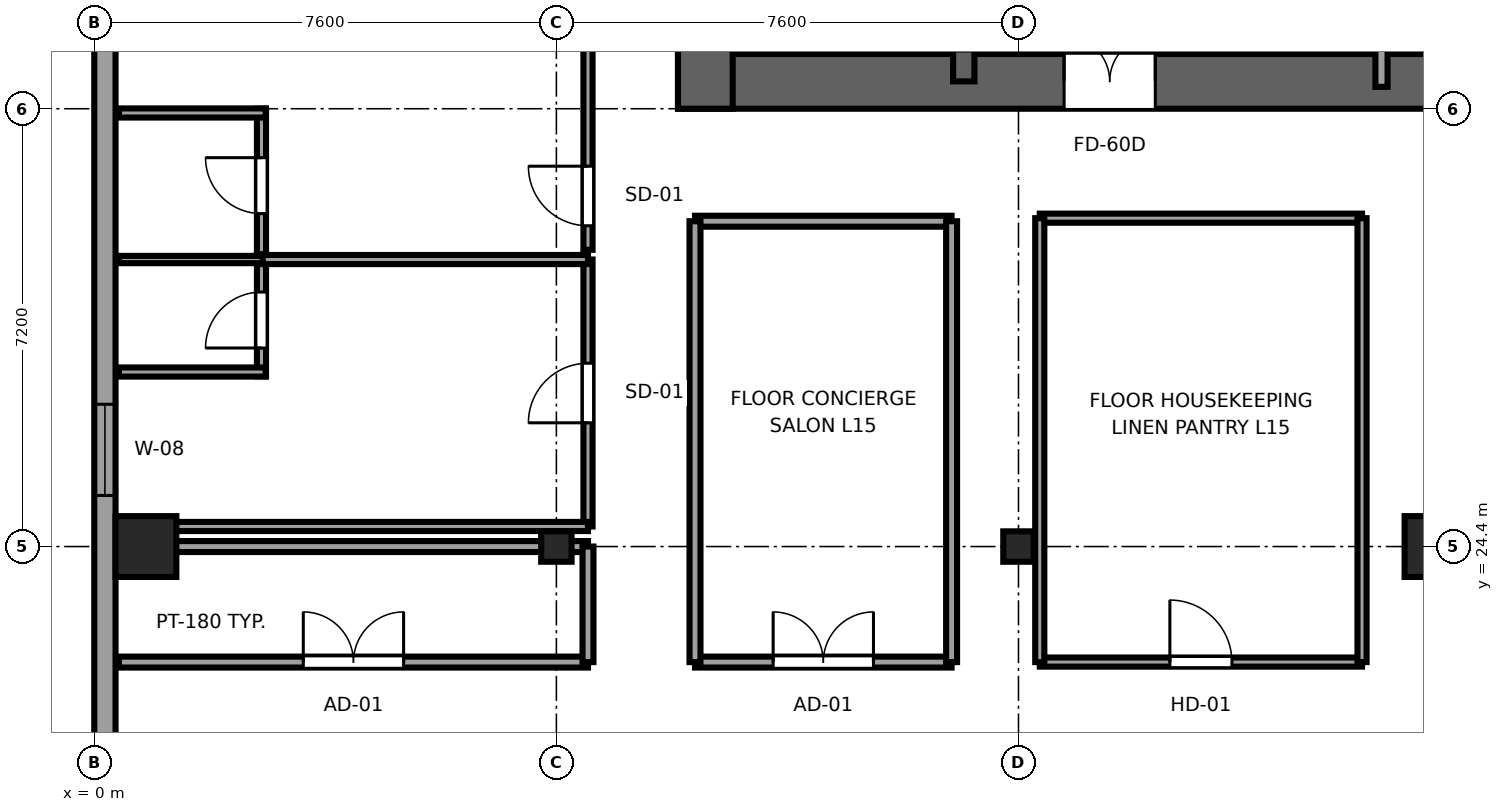
"""IFC4 building model, lengths in metres.
Left out: names, types, materials, properties, quantities, classifications, styles, units other than length and angle.
Written with IfcOpenShell. Run it as: python <this file> out.ifc"""

import sys

from ifc_helpers import new_model, si_unit, direction, frame, frame_2d, origin, origin_2d, place, context, subcontext, project, spatial, rectangle, i_section, extrude, source, transform, mapped, element, fill, save


model = new_model("IFC4")
c1 = context("Model", 3, precision=1e-05, world=origin(), true_north=direction((0.0, 1.0)))
c2 = subcontext(c1, "Body", "Model", "MODEL_VIEW")
j1 = project(units=[si_unit("LENGTHUNIT", "METRE"), si_unit("PLANEANGLEUNIT", "RADIAN")], contexts=[c1])
p1 = place(None, origin())
s1 = spatial("IfcSite", under=j1, at=p1, CompositionType="ELEMENT")
p2 = place(p1, origin())
s2 = spatial("IfcBuilding", under=s1, at=p2, CompositionType="ELEMENT")
p3 = place(p2, frame((0.0, 0.0, 63.95)))
s3 = spatial("IfcBuildingStorey", under=s2, at=p3, CompositionType="ELEMENT", Elevation=63.95)
p4 = place(p3, frame((9.6, 32.05, 0.0), z_axis=(0.0, 0.0, 1.0), x_axis=(1.0, 0.0, 0.0)))
e1 = element("IfcWall", 1, at=p4, inside=s3, PredefinedType="SHEAR", context=c2, shape_type="SweptSolid", body=[
    extrude(rectangle(XDim=26.8, YDim=0.9, at=frame_2d((13.4, 0.0))), origin(), (0.0, 0.0, 1.0), 3.55),
])
p5 = place(p4, frame((7.85, 0.0, 0.0), z_axis=(0.0, 0.0, 1.0), x_axis=(-1.0, 0.0, 0.0)))
e2 = element("IfcOpeningElement", 2, at=p5, cuts=e1, PredefinedType="OPENING", context=c2, shape_type="SweptSolid", body=[
    extrude(rectangle(XDim=1.5, YDim=2.04, at=frame_2d((0.75, 1.02))), frame((0.0, 0.46, 0.0), z_axis=(0.0, -1.0, 0.0), x_axis=(1.0, 0.0, 0.0)), (0.0, 0.0, 1.0), 0.92),
])
p6 = place(p4, frame((14.15, 0.0, 0.0), z_axis=(0.0, 0.0, 1.0), x_axis=(-1.0, 0.0, 0.0)))
e3 = element("IfcOpeningElement", 3, at=p6, cuts=e1, PredefinedType="OPENING", context=c2, shape_type="SweptSolid", body=[
    extrude(rectangle(XDim=1.5, YDim=2.04, at=frame_2d((0.75, 1.02))), frame((0.0, 0.46, 0.0), z_axis=(0.0, -1.0, 0.0), x_axis=(1.0, 0.0, 0.0)), (0.0, 0.0, 1.0), 0.92),
])
p7 = place(p4, frame((20.45, 0.0, 0.0), z_axis=(0.0, 0.0, 1.0), x_axis=(-1.0, 0.0, 0.0)))
e4 = element("IfcOpeningElement", 4, at=p7, cuts=e1, PredefinedType="OPENING", context=c2, shape_type="SweptSolid", body=[
    extrude(rectangle(XDim=1.5, YDim=2.04, at=frame_2d((0.75, 1.02))), frame((0.0, 0.46, 0.0), z_axis=(0.0, -1.0, 0.0), x_axis=(1.0, 0.0, 0.0)), (0.0, 0.0, 1.0), 0.92),
])
p8 = place(p3, frame((10.05, 31.6, 0.0), z_axis=(0.0, 0.0, 1.0), x_axis=(0.0, 1.0, 0.0)))
e5 = element("IfcWall", 5, at=p8, inside=s3, PredefinedType="SHEAR", context=c2, shape_type="SweptSolid", body=[
    extrude(rectangle(XDim=13.6, YDim=0.9, at=frame_2d((6.8, 0.0))), origin(), (0.0, 0.0, 1.0), 3.55),
])
p9 = place(p3, frame((14.3, 32.05, 0.0), z_axis=(0.0, 0.0, 1.0), x_axis=(0.0, 1.0, 0.0)))
e6 = element("IfcWall", 6, at=p9, inside=s3, PredefinedType="SHEAR", context=c2, shape_type="SweptSolid", body=[
    extrude(rectangle(XDim=12.7, YDim=0.35, at=frame_2d((6.35, 0.0))), origin(), (0.0, 0.0, 1.0), 3.55),
])
p10 = place(p9, frame((0.5, 0.0, 0.0)))
e7 = element("IfcOpeningElement", 7, at=p10, cuts=e6, PredefinedType="OPENING", context=c2, shape_type="SweptSolid", body=[
    extrude(rectangle(XDim=1.1, YDim=2.12, at=frame_2d((0.55, 1.06))), frame((0.0, 0.185, 0.0), z_axis=(0.0, -1.0, 0.0), x_axis=(1.0, 0.0, 0.0)), (0.0, 0.0, 1.0), 0.37),
])
m1 = source(origin(), c2, "Body", "SweptSolid", [
    extrude(rectangle(XDim=1.0, YDim=1.0, at=origin_2d()), origin(), (0.0, 0.0, 1.0), 3.55),
])
p11 = place(p3, frame((0.85, 24.4, 0.0), z_axis=(0.0, 0.0, 1.0), x_axis=(1.0, 0.0, 0.0)))
e8 = element("IfcColumn", 8, at=p11, inside=s3, PredefinedType="COLUMN", context=c2, shape_type="MappedRepresentation", body=[
    mapped(m1, transform((0.0, 0.0, 0.0), x_axis=(1.0, 0.0, 0.0), y_axis=(0.0, 1.0, 0.0), z_axis=(0.0, 0.0, 1.0), scale=1.0)),
])
m2 = source(origin(), c2, "Body", "SweptSolid", [
    extrude(i_section(OverallWidth=0.5, OverallDepth=0.5, WebThickness=0.028, FlangeThickness=0.045, at=origin_2d()), origin(), (0.0, 0.0, 1.0), 3.55),
])
for number, where, z_axis, x_axis in (
    (9, (7.6, 24.4, 0.0), (0.0, 0.0, 1.0), (1.0, 0.0, 0.0)),
    (10, (15.2, 24.4, 0.0), (0.0, 0.0, 1.0), (1.0, 0.0, 0.0)),
):
    element("IfcColumn", number, at=place(p3, frame(where, z_axis=z_axis, x_axis=x_axis)), inside=s3, PredefinedType="COLUMN", context=c2, shape_type="MappedRepresentation", body=[
        mapped(m2, transform((0.0, 0.0, 0.0), x_axis=(1.0, 0.0, 0.0), y_axis=(0.0, 1.0, 0.0), z_axis=(0.0, 0.0, 1.0), scale=1.0)),
    ])
p12 = place(p3, frame((22.05, 24.4, 0.0), z_axis=(0.0, 0.0, 1.0), x_axis=(1.0, 0.0, 0.0)))
e11 = element("IfcColumn", 11, at=p12, inside=s3, PredefinedType="COLUMN", context=c2, shape_type="MappedRepresentation", body=[
    mapped(m1, transform((0.0, 0.0, 0.0), x_axis=(1.0, 0.0, 0.0), y_axis=(0.0, 1.0, 0.0), z_axis=(0.0, 0.0, 1.0), scale=1.0)),
])
p13 = place(p3, frame((0.175, 41.383, 0.0), z_axis=(0.0, 0.0, 1.0), x_axis=(0.0, -1.0, 0.0)))
e12 = element("IfcWall", 12, at=p13, inside=s3, PredefinedType="SOLIDWALL", context=c2, shape_type="SweptSolid", body=[
    extrude(rectangle(XDim=36.766, YDim=0.35, at=frame_2d((18.383, 0.0))), origin(), (0.0, 0.0, 1.0), 3.37),
])
p14 = place(p13, frame((1.526, 0.0, 0.68)))
e13 = element("IfcOpeningElement", 13, at=p14, cuts=e12, PredefinedType="OPENING", context=c2, shape_type="SweptSolid", body=[
    extrude(rectangle(XDim=2.1, YDim=1.9, at=frame_2d((1.05, 0.95))), frame((0.0, 0.185, 0.0), z_axis=(0.0, -1.0, 0.0), x_axis=(1.0, 0.0, 0.0)), (0.0, 0.0, 1.0), 0.37),
])
p15 = place(p13, frame((4.428, 0.0, 0.68)))
e14 = element("IfcOpeningElement", 14, at=p15, cuts=e12, PredefinedType="OPENING", context=c2, shape_type="SweptSolid", body=[
    extrude(rectangle(XDim=2.1, YDim=1.9, at=frame_2d((1.05, 0.95))), frame((0.0, 0.185, 0.0), z_axis=(0.0, -1.0, 0.0), x_axis=(1.0, 0.0, 0.0)), (0.0, 0.0, 1.0), 0.37),
])
p16 = place(p13, frame((21.835, 0.0, 0.68)))
e15 = element("IfcOpeningElement", 15, at=p16, cuts=e12, PredefinedType="OPENING", context=c2, shape_type="SweptSolid", body=[
    extrude(rectangle(XDim=2.1, YDim=1.9, at=frame_2d((1.05, 0.95))), frame((0.0, 0.185, 0.0), z_axis=(0.0, -1.0, 0.0), x_axis=(1.0, 0.0, 0.0)), (0.0, 0.0, 1.0), 0.37),
])
p17 = place(p13, frame((28.638, 0.0, 0.68)))
e16 = element("IfcOpeningElement", 16, at=p17, cuts=e12, PredefinedType="OPENING", context=c2, shape_type="SweptSolid", body=[
    extrude(rectangle(XDim=2.1, YDim=1.9, at=frame_2d((1.05, 0.95))), frame((0.0, 0.185, 0.0), z_axis=(0.0, -1.0, 0.0), x_axis=(1.0, 0.0, 0.0)), (0.0, 0.0, 1.0), 0.37),
])
p18 = place(p13, frame((33.893, 0.0, 0.62)))
e17 = element("IfcOpeningElement", 17, at=p18, cuts=e12, PredefinedType="OPENING", context=c2, shape_type="SweptSolid", body=[
    extrude(rectangle(XDim=1.5, YDim=1.55, at=frame_2d((0.75, 0.775))), frame((0.0, 0.185, 0.0), z_axis=(0.0, -1.0, 0.0), x_axis=(1.0, 0.0, 0.0)), (0.0, 0.0, 1.0), 0.37),
])
p19 = place(p13, frame((14.643, 0.0, 0.62)))
e18 = element("IfcOpeningElement", 18, at=p19, cuts=e12, PredefinedType="OPENING", context=c2, shape_type="SweptSolid", body=[
    extrude(rectangle(XDim=1.5, YDim=1.55, at=frame_2d((0.75, 0.775))), frame((0.0, 0.185, 0.0), z_axis=(0.0, -1.0, 0.0), x_axis=(1.0, 0.0, 0.0)), (0.0, 0.0, 1.0), 0.37),
])
p20 = place(p3, frame((18.92, 32.504, 0.0), z_axis=(0.0, 0.0, 1.0), x_axis=(0.0, 1.0, 0.0)))
e19 = element("IfcWall", 19, at=p20, inside=s3, PredefinedType="SOLIDWALL", context=c2, shape_type="SweptSolid", body=[
    extrude(rectangle(XDim=3.646, YDim=0.2, at=frame_2d((1.823, 0.0))), origin(), (0.0, 0.0, 1.0), 3.37),
])
p21 = place(p3, frame((21.17, 31.96, 0.0), z_axis=(0.0, 0.0, 1.0), x_axis=(0.0, 1.0, 0.0)))
e20 = element("IfcWall", 20, at=p21, inside=s3, PredefinedType="SOLIDWALL", context=c2, shape_type="SweptSolid", body=[
    extrude(rectangle(XDim=12.58, YDim=0.2, at=frame_2d((6.29, 0.0))), origin(), (0.0, 0.0, 1.0), 3.37),
])
p22 = place(p3, frame((2.75, 27.2, 0.0), z_axis=(0.0, 0.0, 1.0), x_axis=(0.0, 1.0, 0.0)))
e21 = element("IfcWall", 21, at=p22, inside=s3, PredefinedType="PARTITIONING", context=c2, shape_type="SweptSolid", body=[
    extrude(rectangle(XDim=1.99, YDim=0.15, at=frame_2d((0.995, 0.0))), origin(), (0.0, 0.0, 1.0), 3.37),
])
p23 = place(p22, frame((0.465, 0.0, 0.0)))
e22 = element("IfcOpeningElement", 22, at=p23, cuts=e21, PredefinedType="OPENING", context=c2, shape_type="SweptSolid", body=[
    extrude(rectangle(XDim=0.92, YDim=2.01, at=frame_2d((0.46, 1.005))), frame((0.0, 0.085, 0.0), z_axis=(0.0, -1.0, 0.0), x_axis=(1.0, 0.0, 0.0)), (0.0, 0.0, 1.0), 0.17),
])
p24 = place(p3, frame((0.405, 27.27, 0.0), z_axis=(0.0, 0.0, 1.0), x_axis=(1.0, 0.0, 0.0)))
e23 = element("IfcWall", 23, at=p24, inside=s3, PredefinedType="PARTITIONING", context=c2, shape_type="SweptSolid", body=[
    extrude(rectangle(XDim=2.415, YDim=0.15, at=frame_2d((1.208, 0.0))), origin(), (0.0, 0.0, 1.0), 3.37),
])
p25 = place(p3, frame((0.405, 29.12, 0.0), z_axis=(0.0, 0.0, 1.0), x_axis=(1.0, 0.0, 0.0)))
e24 = element("IfcWall", 24, at=p25, inside=s3, PredefinedType="PLUMBINGWALL", context=c2, shape_type="SweptSolid", body=[
    extrude(rectangle(XDim=2.415, YDim=0.12, at=frame_2d((1.208, 0.0))), origin(), (0.0, 0.0, 1.0), 2.748),
])
p26 = place(p3, frame((2.75, 29.21, 0.0), z_axis=(0.0, 0.0, 1.0), x_axis=(0.0, 1.0, 0.0)))
e25 = element("IfcWall", 25, at=p26, inside=s3, PredefinedType="PARTITIONING", context=c2, shape_type="SweptSolid", body=[
    extrude(rectangle(XDim=2.39, YDim=0.15, at=frame_2d((1.195, 0.0))), origin(), (0.0, 0.0, 1.0), 3.37),
])
p27 = place(p26, frame((0.665, 0.0, 0.0)))
e26 = element("IfcOpeningElement", 26, at=p27, cuts=e25, PredefinedType="OPENING", context=c2, shape_type="SweptSolid", body=[
    extrude(rectangle(XDim=0.92, YDim=2.01, at=frame_2d((0.46, 1.005))), frame((0.0, 0.085, 0.0), z_axis=(0.0, -1.0, 0.0), x_axis=(1.0, 0.0, 0.0)), (0.0, 0.0, 1.0), 0.17),
])
p28 = place(p3, frame((0.405, 31.53, 0.0), z_axis=(0.0, 0.0, 1.0), x_axis=(1.0, 0.0, 0.0)))
e27 = element("IfcWall", 27, at=p28, inside=s3, PredefinedType="PARTITIONING", context=c2, shape_type="SweptSolid", body=[
    extrude(rectangle(XDim=2.415, YDim=0.15, at=frame_2d((1.208, 0.0))), origin(), (0.0, 0.0, 1.0), 3.37),
])
p29 = place(p3, frame((0.405, 22.5, 0.0), z_axis=(0.0, 0.0, 1.0), x_axis=(1.0, 0.0, 0.0)))
e28 = element("IfcWall", 28, at=p29, inside=s3, PredefinedType="PARTITIONING", context=c2, shape_type="SweptSolid", body=[
    extrude(rectangle(XDim=7.715, YDim=0.18, at=frame_2d((3.857, 0.0))), origin(), (0.0, 0.0, 1.0), 3.37),
])
p30 = place(p29, frame((3.032, 0.0, 0.0)))
e29 = element("IfcOpeningElement", 29, at=p30, cuts=e28, PredefinedType="OPENING", context=c2, shape_type="SweptSolid", body=[
    extrude(rectangle(XDim=1.65, YDim=2.15, at=frame_2d((0.825, 1.075))), frame((0.0, 0.1, 0.0), z_axis=(0.0, -1.0, 0.0), x_axis=(1.0, 0.0, 0.0)), (0.0, 0.0, 1.0), 0.2),
])
p31 = place(p3, frame((0.405, 24.4, 0.0), z_axis=(0.0, 0.0, 1.0), x_axis=(1.0, 0.0, 0.0)))
e30 = element("IfcWall", 30, at=p31, inside=s3, PredefinedType="PARTITIONING", context=c2, shape_type="SweptSolid", body=[
    extrude(rectangle(XDim=7.715, YDim=0.18, at=frame_2d((3.857, 0.0))), origin(), (0.0, 0.0, 1.0), 2.748),
])
p32 = place(p3, frame((8.12, 22.5, 0.0), z_axis=(0.0, 0.0, 1.0), x_axis=(0.0, 1.0, 0.0)))
e31 = element("IfcWall", 31, at=p32, inside=s3, PredefinedType="PARTITIONING", context=c2, shape_type="SweptSolid", body=[
    extrude(rectangle(XDim=1.9, YDim=0.18, at=frame_2d((0.95, 0.0))), origin(), (0.0, 0.0, 1.0), 3.37),
])
p33 = place(p3, frame((8.12, 24.73, 0.0), z_axis=(0.0, 0.0, 1.0), x_axis=(0.0, 1.0, 0.0)))
e32 = element("IfcWall", 32, at=p33, inside=s3, PredefinedType="PARTITIONING", context=c2, shape_type="SweptSolid", body=[
    extrude(rectangle(XDim=4.39, YDim=0.15, at=frame_2d((2.195, 0.0))), origin(), (0.0, 0.0, 1.0), 3.37),
])
p34 = place(p33, frame((1.705, 0.0, 0.0)))
e33 = element("IfcOpeningElement", 33, at=p34, cuts=e32, PredefinedType="OPENING", context=c2, shape_type="SweptSolid", body=[
    extrude(rectangle(XDim=0.98, YDim=2.12, at=frame_2d((0.49, 1.06))), frame((0.0, 0.085, 0.0), z_axis=(0.0, -1.0, 0.0), x_axis=(1.0, 0.0, 0.0)), (0.0, 0.0, 1.0), 0.17),
])
p35 = place(p3, frame((0.405, 24.73, 0.0), z_axis=(0.0, 0.0, 1.0), x_axis=(1.0, 0.0, 0.0)))
e34 = element("IfcWall", 34, at=p35, inside=s3, PredefinedType="PARTITIONING", context=c2, shape_type="SweptSolid", body=[
    extrude(rectangle(XDim=7.715, YDim=0.15, at=frame_2d((3.857, 0.0))), origin(), (0.0, 0.0, 1.0), 3.37),
])
p36 = place(p3, frame((2.77, 29.12, 0.0), z_axis=(0.0, 0.0, 1.0), x_axis=(1.0, 0.0, 0.0)))
e35 = element("IfcWall", 35, at=p36, inside=s3, PredefinedType="PARTITIONING", context=c2, shape_type="SweptSolid", body=[
    extrude(rectangle(XDim=5.35, YDim=0.15, at=frame_2d((2.675, 0.0))), origin(), (0.0, 0.0, 1.0), 2.748),
])
p37 = place(p3, frame((8.12, 29.28, 0.0), z_axis=(0.0, 0.0, 1.0), x_axis=(0.0, 1.0, 0.0)))
e36 = element("IfcWall", 36, at=p37, inside=s3, PredefinedType="PARTITIONING", context=c2, shape_type="SweptSolid", body=[
    extrude(rectangle(XDim=16.315, YDim=0.15, at=frame_2d((8.157, 0.0))), origin(), (0.0, 0.0, 1.0), 3.37),
])
p38 = place(p37, frame((0.395, 0.0, 0.0)))
e37 = element("IfcOpeningElement", 37, at=p38, cuts=e36, PredefinedType="OPENING", context=c2, shape_type="SweptSolid", body=[
    extrude(rectangle(XDim=0.98, YDim=2.12, at=frame_2d((0.49, 1.06))), frame((0.0, 0.085, 0.0), z_axis=(0.0, -1.0, 0.0), x_axis=(1.0, 0.0, 0.0)), (0.0, 0.0, 1.0), 0.17),
])
p39 = place(p3, frame((9.88, 22.5, 0.0), z_axis=(0.0, 0.0, 1.0), x_axis=(1.0, 0.0, 0.0)))
e38 = element("IfcWall", 38, at=p39, inside=s3, PredefinedType="PARTITIONING", context=c2, shape_type="SweptSolid", body=[
    extrude(rectangle(XDim=4.22, YDim=0.18, at=frame_2d((2.11, 0.0))), origin(), (0.0, 0.0, 1.0), 3.37),
])
p40 = place(p39, frame((1.285, 0.0, 0.0)))
e39 = element("IfcOpeningElement", 39, at=p40, cuts=e38, PredefinedType="OPENING", context=c2, shape_type="SweptSolid", body=[
    extrude(rectangle(XDim=1.65, YDim=2.15, at=frame_2d((0.825, 1.075))), frame((0.0, 0.1, 0.0), z_axis=(0.0, -1.0, 0.0), x_axis=(1.0, 0.0, 0.0)), (0.0, 0.0, 1.0), 0.2),
])
p41 = place(p3, frame((9.88, 29.75, 0.0), z_axis=(0.0, 0.0, 1.0), x_axis=(1.0, 0.0, 0.0)))
e40 = element("IfcWall", 40, at=p41, inside=s3, PredefinedType="PARTITIONING", context=c2, shape_type="SweptSolid", body=[
    extrude(rectangle(XDim=4.22, YDim=0.18, at=frame_2d((2.11, 0.0))), origin(), (0.0, 0.0, 1.0), 3.37),
])
for number, where, z_axis, x_axis in (
    (41, (9.88, 22.5, 0.0), (0.0, 0.0, 1.0), (0.0, 1.0, 0.0)),
    (42, (14.1, 22.5, 0.0), (0.0, 0.0, 1.0), (0.0, 1.0, 0.0)),
):
    element("IfcWall", number, at=place(p3, frame(where, z_axis=z_axis, x_axis=x_axis)), inside=s3, PredefinedType="PARTITIONING", context=c2, shape_type="SweptSolid", body=[
        extrude(rectangle(XDim=7.25, YDim=0.18, at=frame_2d((3.625, 0.0))), origin(), (0.0, 0.0, 1.0), 3.37),
    ])
p42 = place(p3, frame((15.55, 22.5, 0.0), z_axis=(0.0, 0.0, 1.0), x_axis=(1.0, 0.0, 0.0)))
e43 = element("IfcWall", 43, at=p42, inside=s3, PredefinedType="PARTITIONING", context=c2, shape_type="SweptSolid", body=[
    extrude(rectangle(XDim=5.3, YDim=0.15, at=frame_2d((2.65, 0.0))), origin(), (0.0, 0.0, 1.0), 3.37),
])
p43 = place(p42, frame((2.14, 0.0, 0.0)))
e44 = element("IfcOpeningElement", 44, at=p43, cuts=e43, PredefinedType="OPENING", context=c2, shape_type="SweptSolid", body=[
    extrude(rectangle(XDim=1.02, YDim=2.03, at=frame_2d((0.51, 1.015))), frame((0.0, 0.085, 0.0), z_axis=(0.0, -1.0, 0.0), x_axis=(1.0, 0.0, 0.0)), (0.0, 0.0, 1.0), 0.17),
])
p44 = place(p3, frame((15.55, 29.8, 0.0), z_axis=(0.0, 0.0, 1.0), x_axis=(1.0, 0.0, 0.0)))
e45 = element("IfcWall", 45, at=p44, inside=s3, PredefinedType="PARTITIONING", context=c2, shape_type="SweptSolid", body=[
    extrude(rectangle(XDim=5.3, YDim=0.15, at=frame_2d((2.65, 0.0))), origin(), (0.0, 0.0, 1.0), 3.37),
])
for number, where, z_axis, x_axis in (
    (46, (15.55, 22.5, 0.0), (0.0, 0.0, 1.0), (0.0, 1.0, 0.0)),
    (47, (20.85, 22.5, 0.0), (0.0, 0.0, 1.0), (0.0, 1.0, 0.0)),
):
    element("IfcWall", number, at=place(p3, frame(where, z_axis=z_axis, x_axis=x_axis)), inside=s3, PredefinedType="PARTITIONING", context=c2, shape_type="SweptSolid", body=[
        extrude(rectangle(XDim=7.3, YDim=0.15, at=frame_2d((3.65, 0.0))), origin(), (0.0, 0.0, 1.0), 3.37),
    ])
m3 = source(origin(), c2, "Body", "SweptSolid", [
    extrude(rectangle(XDim=1.5, YDim=1.55, at=frame_2d((0.75, 0.775))), frame((0.0, 0.09, 0.0), z_axis=(0.0, -1.0, 0.0), x_axis=(1.0, 0.0, 0.0)), (0.0, 0.0, 1.0), 0.06),
])
p45 = place(p19, origin())
e48 = element("IfcWindow", 48, at=p45, inside=s3, PartitioningType="SINGLE_PANEL", PredefinedType="WINDOW", context=c2, shape_type="MappedRepresentation", body=[
    mapped(m3, transform((0.0, 0.0, 0.0), x_axis=(1.0, 0.0, 0.0), y_axis=(0.0, 1.0, 0.0), z_axis=(0.0, 0.0, 1.0), scale=1.0)),
])
fill(e18, e48)
m4 = source(origin(), c2, "Body", "SweptSolid", [
    extrude(rectangle(XDim=1.5, YDim=2.04, at=frame_2d((0.75, 1.02))), frame((0.0, 0.025, 0.0), z_axis=(0.0, -1.0, 0.0), x_axis=(1.0, 0.0, 0.0)), (0.0, 0.0, 1.0), 0.05),
])
p46 = place(p5, origin())
e49 = element("IfcDoor", 49, at=p46, inside=s3, OperationType="DOUBLE_DOOR_SINGLE_SWING", PredefinedType="DOOR", context=c2, shape_type="MappedRepresentation", body=[
    mapped(m4, transform((0.0, 0.0, 0.0), x_axis=(1.0, 0.0, 0.0), y_axis=(0.0, 1.0, 0.0), z_axis=(0.0, 0.0, 1.0), scale=1.0)),
])
fill(e2, e49)
m5 = source(origin(), c2, "Body", "SweptSolid", [
    extrude(rectangle(XDim=0.92, YDim=2.01, at=frame_2d((0.46, 1.005))), frame((0.0, 0.025, 0.0), z_axis=(0.0, -1.0, 0.0), x_axis=(1.0, 0.0, 0.0)), (0.0, 0.0, 1.0), 0.05),
])
p47 = place(p23, origin())
e50 = element("IfcDoor", 50, at=p47, inside=s3, OperationType="SINGLE_SWING_LEFT", PredefinedType="DOOR", context=c2, shape_type="MappedRepresentation", body=[
    mapped(m5, transform((0.0, 0.0, 0.0), x_axis=(1.0, 0.0, 0.0), y_axis=(0.0, 1.0, 0.0), z_axis=(0.0, 0.0, 1.0), scale=1.0)),
])
fill(e22, e50)
p48 = place(p27, origin())
e51 = element("IfcDoor", 51, at=p48, inside=s3, OperationType="SINGLE_SWING_RIGHT", PredefinedType="DOOR", context=c2, shape_type="MappedRepresentation", body=[
    mapped(m5, transform((0.0, 0.0, 0.0), x_axis=(1.0, 0.0, 0.0), y_axis=(0.0, 1.0, 0.0), z_axis=(0.0, 0.0, 1.0), scale=1.0)),
])
fill(e26, e51)
m6 = source(origin(), c2, "Body", "SweptSolid", [
    extrude(rectangle(XDim=1.65, YDim=2.15, at=frame_2d((0.825, 1.075))), frame((0.0, 0.025, 0.0), z_axis=(0.0, -1.0, 0.0), x_axis=(1.0, 0.0, 0.0)), (0.0, 0.0, 1.0), 0.05),
])
p49 = place(p30, origin())
e52 = element("IfcDoor", 52, at=p49, inside=s3, OperationType="DOUBLE_DOOR_SINGLE_SWING", PredefinedType="DOOR", context=c2, shape_type="MappedRepresentation", body=[
    mapped(m6, transform((0.0, 0.0, 0.0), x_axis=(1.0, 0.0, 0.0), y_axis=(0.0, 1.0, 0.0), z_axis=(0.0, 0.0, 1.0), scale=1.0)),
])
fill(e29, e52)
m7 = source(origin(), c2, "Body", "SweptSolid", [
    extrude(rectangle(XDim=0.98, YDim=2.12, at=frame_2d((0.49, 1.06))), frame((0.0, 0.025, 0.0), z_axis=(0.0, -1.0, 0.0), x_axis=(1.0, 0.0, 0.0)), (0.0, 0.0, 1.0), 0.05),
])
p50 = place(p34, origin())
e53 = element("IfcDoor", 53, at=p50, inside=s3, OperationType="SINGLE_SWING_LEFT", PredefinedType="DOOR", context=c2, shape_type="MappedRepresentation", body=[
    mapped(m7, transform((0.0, 0.0, 0.0), x_axis=(1.0, 0.0, 0.0), y_axis=(0.0, 1.0, 0.0), z_axis=(0.0, 0.0, 1.0), scale=1.0)),
])
fill(e33, e53)
p51 = place(p38, origin())
e54 = element("IfcDoor", 54, at=p51, inside=s3, OperationType="SINGLE_SWING_RIGHT", PredefinedType="DOOR", context=c2, shape_type="MappedRepresentation", body=[
    mapped(m7, transform((0.0, 0.0, 0.0), x_axis=(1.0, 0.0, 0.0), y_axis=(0.0, 1.0, 0.0), z_axis=(0.0, 0.0, 1.0), scale=1.0)),
])
fill(e37, e54)
p52 = place(p40, origin())
e55 = element("IfcDoor", 55, at=p52, inside=s3, OperationType="DOUBLE_DOOR_SINGLE_SWING", PredefinedType="DOOR", context=c2, shape_type="MappedRepresentation", body=[
    mapped(m6, transform((0.0, 0.0, 0.0), x_axis=(1.0, 0.0, 0.0), y_axis=(0.0, 1.0, 0.0), z_axis=(0.0, 0.0, 1.0), scale=1.0)),
])
fill(e39, e55)
m8 = source(origin(), c2, "Body", "SweptSolid", [
    extrude(rectangle(XDim=1.02, YDim=2.03, at=frame_2d((0.51, 1.015))), frame((0.0, 0.025, 0.0), z_axis=(0.0, -1.0, 0.0), x_axis=(1.0, 0.0, 0.0)), (0.0, 0.0, 1.0), 0.05),
])
p53 = place(p43, origin())
e56 = element("IfcDoor", 56, at=p53, inside=s3, OperationType="SINGLE_SWING_LEFT", PredefinedType="DOOR", context=c2, shape_type="MappedRepresentation", body=[
    mapped(m8, transform((0.0, 0.0, 0.0), x_axis=(1.0, 0.0, 0.0), y_axis=(0.0, 1.0, 0.0), z_axis=(0.0, 0.0, 1.0), scale=1.0)),
])
fill(e44, e56)
save(model, sys.argv[1])
